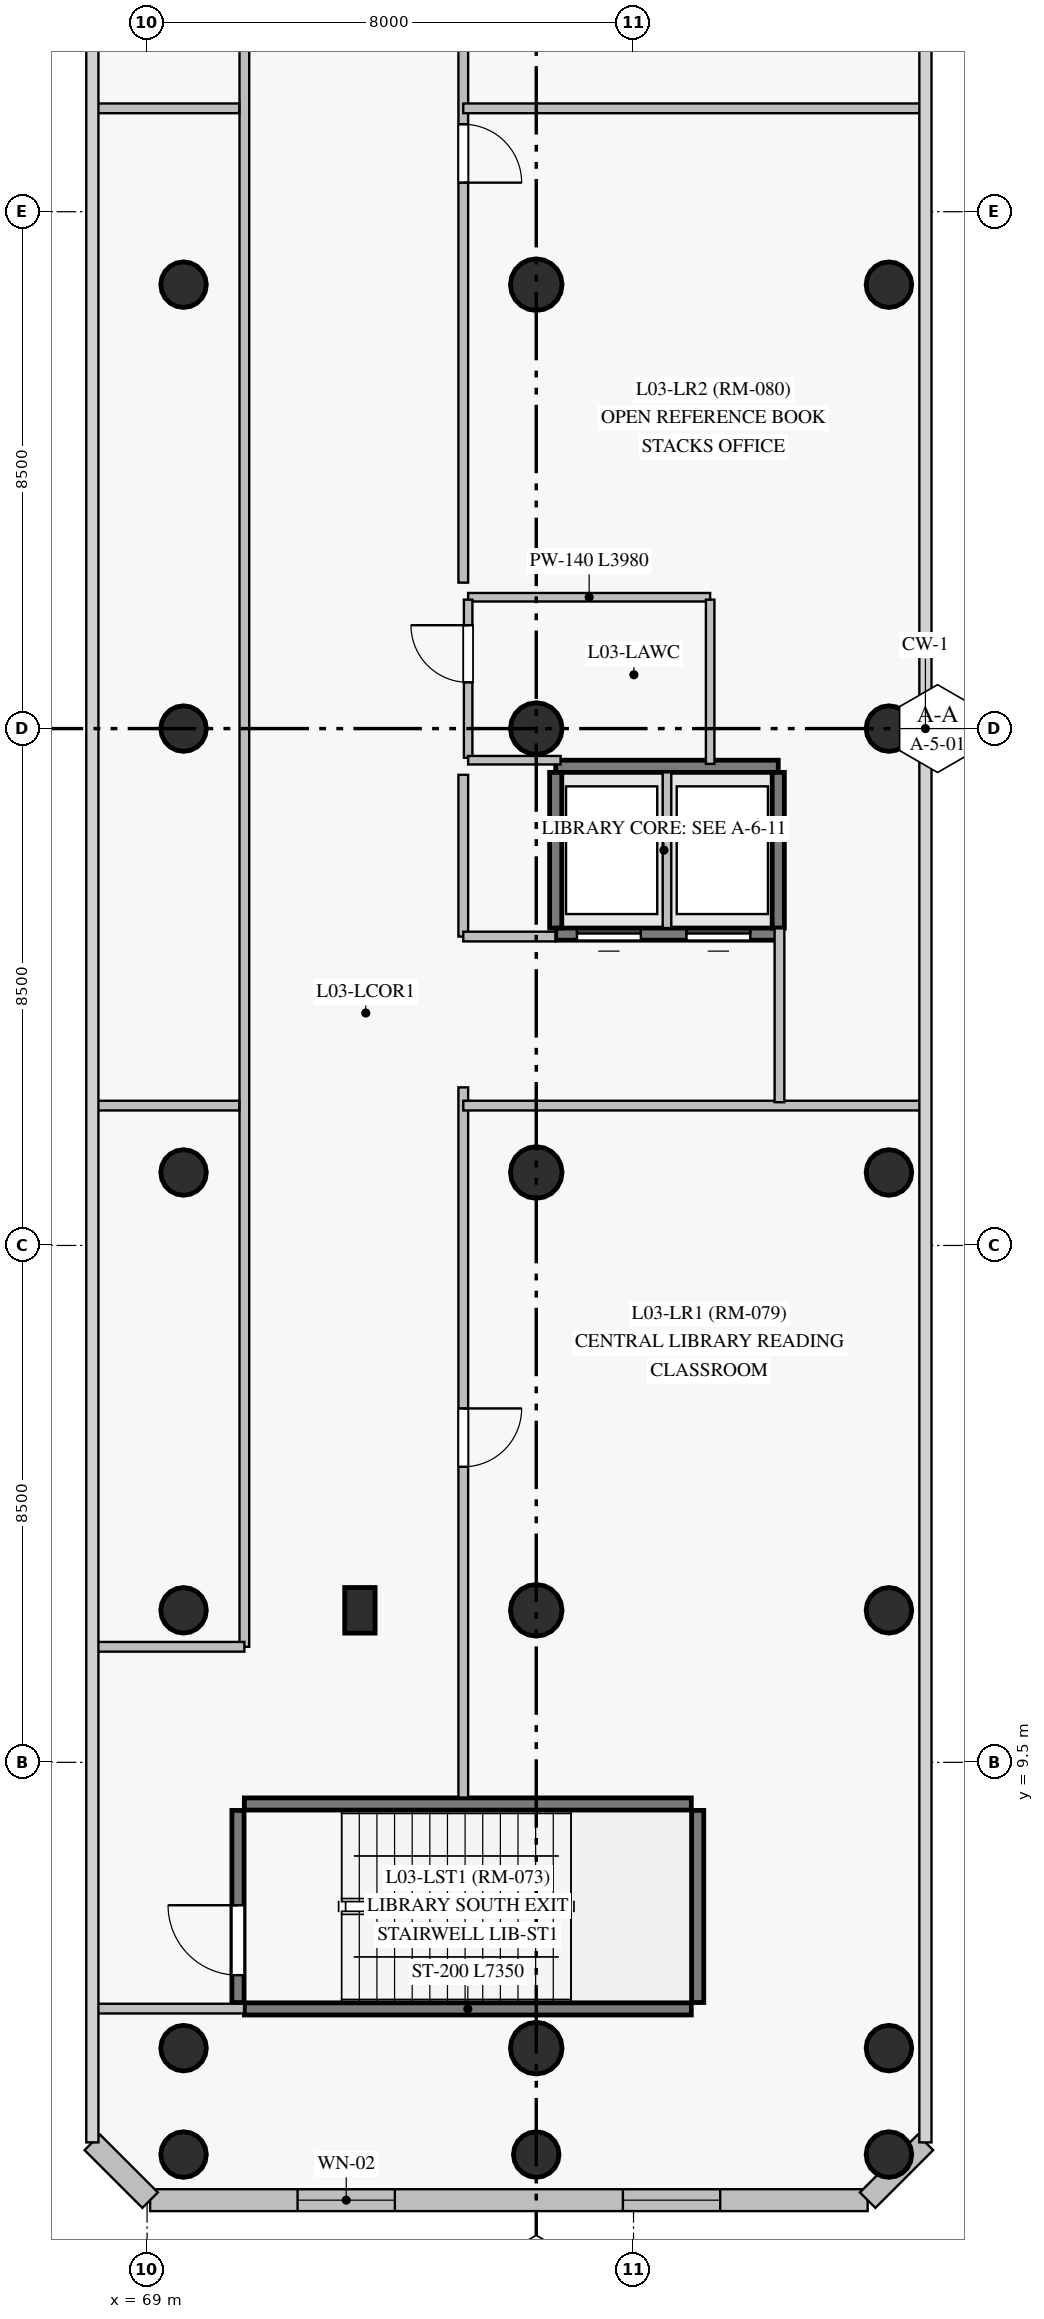
"""IFC4 building model, lengths in metres.
Left out: names, types, materials, properties, quantities, classifications, styles, units other than length and angle.
Written with IfcOpenShell. Run it as: python <this file> out.ifc"""

import sys

from ifc_helpers import new_model, si_unit, direction, frame, frame_2d, origin, origin_with_axes, origin_2d, place, context, subcontext, project, spatial, rectangle, circle, extrude, source, transform, mapped, element, fill, save


model = new_model("IFC4")
c1 = context("Model", 3, precision=1e-05, world=origin(), true_north=direction((0.0, 1.0)))
c2 = subcontext(c1, "Body", "Model", "MODEL_VIEW")
j1 = project(units=[si_unit("LENGTHUNIT", "METRE"), si_unit("PLANEANGLEUNIT", "RADIAN")], contexts=[c1])
p1 = place(None, origin())
s1 = spatial("IfcSite", under=j1, at=p1, CompositionType="ELEMENT")
p2 = place(p1, origin())
s2 = spatial("IfcBuilding", under=s1, at=p2, CompositionType="ELEMENT")
p3 = place(p2, frame((0.0, 0.0, 13.5)))
s3 = spatial("IfcBuildingStorey", under=s2, at=p3, CompositionType="ELEMENT", Elevation=13.5)
m1 = source(origin_with_axes(), c2, "Body", "SweptSolid", [
    extrude(circle(Radius=0.375, at=origin_2d()), origin(), (0.0, 0.0, 1.0), 4.5),
])
for number, where, z_axis, x_axis in (
    (1, (69.6, 3.05, 0.0), (0.0, 0.0, 1.0), (1.0, 0.0, 0.0)),
    (2, (75.4, 3.05, 0.0), (0.0, 0.0, 1.0), (1.0, 0.0, 0.0)),
    (3, (81.2, 3.05, 0.0), (0.0, 0.0, 1.0), (1.0, 0.0, 0.0)),
    (4, (69.6, 4.8, 0.0), (0.0, 0.0, 1.0), (1.0, 0.0, 0.0)),
    (5, (69.6, 12.0, 0.0), (0.0, 0.0, 1.0), (1.0, 0.0, 0.0)),
    (6, (69.6, 19.2, 0.0), (0.0, 0.0, 1.0), (1.0, 0.0, 0.0)),
    (7, (69.6, 26.5, 0.0), (0.0, 0.0, 1.0), (1.0, 0.0, 0.0)),
    (8, (69.6, 33.8, 0.0), (0.0, 0.0, 1.0), (1.0, 0.0, 0.0)),
):
    element("IfcColumn", number, at=place(p3, frame(where, z_axis=z_axis, x_axis=x_axis)), inside=s3, PredefinedType="COLUMN", context=c2, shape_type="MappedRepresentation", body=[
        mapped(m1, transform((0.0, 0.0, 0.0), scale=1.0)),
    ])
m2 = source(origin_with_axes(), c2, "Body", "SweptSolid", [
    extrude(circle(Radius=0.425, at=origin_2d()), origin(), (0.0, 0.0, 1.0), 4.5),
])
for number, where, z_axis, x_axis in (
    (9, (75.4, 4.8, 0.0), (0.0, 0.0, 1.0), (1.0, 0.0, 0.0)),
    (10, (75.4, 12.0, 0.0), (0.0, 0.0, 1.0), (1.0, 0.0, 0.0)),
    (11, (75.4, 19.2, 0.0), (0.0, 0.0, 1.0), (1.0, 0.0, 0.0)),
    (12, (75.4, 26.5, 0.0), (0.0, 0.0, 1.0), (1.0, 0.0, 0.0)),
    (13, (75.4, 33.8, 0.0), (0.0, 0.0, 1.0), (1.0, 0.0, 0.0)),
):
    element("IfcColumn", number, at=place(p3, frame(where, z_axis=z_axis, x_axis=x_axis)), inside=s3, PredefinedType="COLUMN", context=c2, shape_type="MappedRepresentation", body=[
        mapped(m2, transform((0.0, 0.0, 0.0), scale=1.0)),
    ])
for number, where, z_axis, x_axis in (
    (14, (81.2, 4.8, 0.0), (0.0, 0.0, 1.0), (1.0, 0.0, 0.0)),
    (15, (81.2, 12.0, 0.0), (0.0, 0.0, 1.0), (1.0, 0.0, 0.0)),
    (16, (81.2, 19.2, 0.0), (0.0, 0.0, 1.0), (1.0, 0.0, 0.0)),
    (17, (81.2, 26.5, 0.0), (0.0, 0.0, 1.0), (1.0, 0.0, 0.0)),
    (18, (81.2, 33.8, 0.0), (0.0, 0.0, 1.0), (1.0, 0.0, 0.0)),
):
    element("IfcColumn", number, at=place(p3, frame(where, z_axis=z_axis, x_axis=x_axis)), inside=s3, PredefinedType="COLUMN", context=c2, shape_type="MappedRepresentation", body=[
        mapped(m1, transform((0.0, 0.0, 0.0), scale=1.0)),
    ])
m3 = source(origin_with_axes(), c2, "Body", "SweptSolid", [
    extrude(rectangle(XDim=0.5, YDim=0.75, at=origin_2d()), origin(), (0.0, 0.0, 1.0), 4.5),
])
p4 = place(p3, frame((72.5, 12.0, 0.0), z_axis=(0.0, 0.0, 1.0), x_axis=(1.0, 0.0, 0.0)))
e19 = element("IfcColumn", 19, at=p4, inside=s3, PredefinedType="PILASTER", context=c2, shape_type="MappedRepresentation", body=[
    mapped(m3, transform((0.0, 0.0, 0.0), scale=1.0)),
])
p5 = place(p3, frame((69.05, 2.3, 0.0), z_axis=(0.0, 0.0, 1.0), x_axis=(1.0, 0.0, 0.0)))
e20 = element("IfcWall", 20, at=p5, inside=s3, PredefinedType="SOLIDWALL", context=c2, shape_type="SweptSolid", body=[
    extrude(rectangle(XDim=11.8, YDim=0.36, at=frame_2d((5.9, 0.0))), origin(), (0.0, 0.0, 1.0), 4.225),
])
p6 = place(p5, frame((2.425, 0.0, 0.85)))
e21 = element("IfcOpeningElement", 21, at=p6, cuts=e20, PredefinedType="OPENING", context=c2, shape_type="SweptSolid", body=[
    extrude(rectangle(XDim=1.6, YDim=2.2, at=frame_2d((0.8, 1.1))), frame((0.0, 0.19, 0.0), z_axis=(0.0, -1.0, 0.0), x_axis=(1.0, 0.0, 0.0)), (0.0, 0.0, 1.0), 0.38),
])
p7 = place(p5, frame((7.775, 0.0, 0.85)))
e22 = element("IfcOpeningElement", 22, at=p7, cuts=e20, PredefinedType="OPENING", context=c2, shape_type="SweptSolid", body=[
    extrude(rectangle(XDim=1.6, YDim=2.2, at=frame_2d((0.8, 1.1))), frame((0.0, 0.19, 0.0), z_axis=(0.0, -1.0, 0.0), x_axis=(1.0, 0.0, 0.0)), (0.0, 0.0, 1.0), 0.38),
])
for number, where, z_axis, x_axis in (
    (23, (80.85, 2.3, 0.0), (0.0, 0.0, 1.0), (0.707, 0.707, 0.0)),
    (24, (68.1, 3.25, 0.0), (0.0, 0.0, 1.0), (0.707, -0.707, 0.0)),
):
    element("IfcWall", number, at=place(p3, frame(where, z_axis=z_axis, x_axis=x_axis)), inside=s3, PredefinedType="SOLIDWALL", context=c2, shape_type="SweptSolid", body=[
        extrude(rectangle(XDim=1.344, YDim=0.36, at=frame_2d((0.672, 0.0))), origin(), (0.0, 0.0, 1.0), 4.225),
    ])
for number, where, z_axis, x_axis in (
    (25, (70.6, 5.445, 0.0), (0.0, 0.0, 1.0), (1.0, 0.0, 0.0)),
    (26, (70.6, 8.815, 0.0), (0.0, 0.0, 1.0), (1.0, 0.0, 0.0)),
):
    element("IfcWall", number, at=place(p3, frame(where, z_axis=z_axis, x_axis=x_axis)), inside=s3, PredefinedType="SHEAR", context=c2, shape_type="SweptSolid", body=[
        extrude(rectangle(XDim=7.35, YDim=0.2, at=frame_2d((3.675, 0.0))), origin(), (0.0, 0.0, 1.0), 4.225),
    ])
p8 = place(p3, frame((75.72, 23.12, 0.0), z_axis=(0.0, 0.0, 1.0), x_axis=(1.0, 0.0, 0.0)))
e27 = element("IfcWall", 27, at=p8, inside=s3, PredefinedType="SHEAR", context=c2, shape_type="SweptSolid", body=[
    extrude(rectangle(XDim=3.66, YDim=0.2, at=frame_2d((1.83, 0.0))), origin(), (0.0, 0.0, 1.0), 4.225),
])
p9 = place(p8, frame((0.35, 0.0, 0.0)))
e28 = element("IfcOpeningElement", 28, at=p9, cuts=e27, PredefinedType="OPENING", context=c2, shape_type="SweptSolid", body=[
    extrude(rectangle(XDim=1.05, YDim=2.15, at=frame_2d((0.525, 1.075))), frame((0.0, 0.11, 0.0), z_axis=(0.0, -1.0, 0.0), x_axis=(1.0, 0.0, 0.0)), (0.0, 0.0, 1.0), 0.22),
])
p10 = place(p8, frame((2.15, 0.0, 0.0)))
e29 = element("IfcOpeningElement", 29, at=p10, cuts=e27, PredefinedType="OPENING", context=c2, shape_type="SweptSolid", body=[
    extrude(rectangle(XDim=1.05, YDim=2.15, at=frame_2d((0.525, 1.075))), frame((0.0, 0.11, 0.0), z_axis=(0.0, -1.0, 0.0), x_axis=(1.0, 0.0, 0.0)), (0.0, 0.0, 1.0), 0.22),
])
p11 = place(p3, frame((75.72, 25.88, 0.0), z_axis=(0.0, 0.0, 1.0), x_axis=(1.0, 0.0, 0.0)))
e30 = element("IfcWall", 30, at=p11, inside=s3, PredefinedType="SHEAR", context=c2, shape_type="SweptSolid", body=[
    extrude(rectangle(XDim=3.66, YDim=0.2, at=frame_2d((1.83, 0.0))), origin(), (0.0, 0.0, 1.0), 4.225),
])
p12 = place(p3, frame((70.495, 5.55, 0.0), z_axis=(0.0, 0.0, 1.0), x_axis=(0.0, 1.0, 0.0)))
e31 = element("IfcWall", 31, at=p12, inside=s3, PredefinedType="SHEAR", context=c2, shape_type="SweptSolid", body=[
    extrude(rectangle(XDim=3.16, YDim=0.2, at=frame_2d((1.58, 0.0))), origin(), (0.0, 0.0, 1.0), 4.225),
])
p13 = place(p12, frame((0.45, 0.0, 0.0)))
e32 = element("IfcOpeningElement", 32, at=p13, cuts=e31, PredefinedType="OPENING", context=c2, shape_type="SweptSolid", body=[
    extrude(rectangle(XDim=1.15, YDim=2.15, at=frame_2d((0.575, 1.075))), frame((0.0, 0.11, 0.0), z_axis=(0.0, -1.0, 0.0), x_axis=(1.0, 0.0, 0.0)), (0.0, 0.0, 1.0), 0.22),
])
p14 = place(p3, frame((78.055, 5.55, 0.0), z_axis=(0.0, 0.0, 1.0), x_axis=(0.0, 1.0, 0.0)))
e33 = element("IfcWall", 33, at=p14, inside=s3, PredefinedType="SHEAR", context=c2, shape_type="SweptSolid", body=[
    extrude(rectangle(XDim=3.16, YDim=0.2, at=frame_2d((1.58, 0.0))), origin(), (0.0, 0.0, 1.0), 4.225),
])
for number, where, z_axis, x_axis in (
    (34, (75.72, 23.22, 0.0), (0.0, 0.0, 1.0), (0.0, 1.0, 0.0)),
    (35, (79.38, 23.22, 0.0), (0.0, 0.0, 1.0), (0.0, 1.0, 0.0)),
):
    element("IfcWall", number, at=place(p3, frame(where, z_axis=z_axis, x_axis=x_axis)), inside=s3, PredefinedType="SHEAR", context=c2, shape_type="SweptSolid", body=[
        extrude(rectangle(XDim=2.56, YDim=0.2, at=frame_2d((1.28, 0.0))), origin(), (0.0, 0.0, 1.0), 4.225),
    ])
p15 = place(p3, frame((70.6, 11.4, 0.0), z_axis=(0.0, 0.0, 1.0), x_axis=(0.0, 1.0, 0.0)))
e36 = element("IfcWall", 36, at=p15, inside=s3, PredefinedType="PARTITIONING", context=c2, shape_type="SweptSolid", body=[
    extrude(rectangle(XDim=30.2, YDim=0.16, at=frame_2d((15.1, 0.0))), origin(), (0.0, 0.0, 1.0), 4.225),
])
p16 = place(p3, frame((74.2, 44.038, 0.0), z_axis=(0.0, 0.0, 1.0), x_axis=(0.0, -1.0, 0.0)))
e37 = element("IfcWall", 37, at=p16, inside=s3, PredefinedType="PARTITIONING", context=c2, shape_type="SweptSolid", body=[
    extrude(rectangle(XDim=15.138, YDim=0.16, at=frame_2d((7.569, 0.0))), origin(), (0.0, 0.0, 1.0), 4.225),
])
p17 = place(p16, frame((7.6, 0.0, 0.0)))
e38 = element("IfcOpeningElement", 38, at=p17, cuts=e37, PredefinedType="OPENING", context=c2, shape_type="SweptSolid", body=[
    extrude(rectangle(XDim=0.96, YDim=2.15, at=frame_2d((0.48, 1.075))), frame((0.0, 0.09, 0.0), z_axis=(0.0, -1.0, 0.0), x_axis=(1.0, 0.0, 0.0)), (0.0, 0.0, 1.0), 0.18),
])
p18 = place(p16, frame((4.764, 0.0, 0.0)))
e39 = element("IfcOpeningElement", 39, at=p18, cuts=e37, PredefinedType="OPENING", context=c2, shape_type="SweptSolid", body=[
    extrude(rectangle(XDim=0.96, YDim=2.15, at=frame_2d((0.48, 1.075))), frame((0.0, 0.09, 0.0), z_axis=(0.0, -1.0, 0.0), x_axis=(1.0, 0.0, 0.0)), (0.0, 0.0, 1.0), 0.18),
])
p19 = place(p3, frame((74.2, 20.6, 0.0), z_axis=(0.0, 0.0, 1.0), x_axis=(0.0, -1.0, 0.0)))
e40 = element("IfcWall", 40, at=p19, inside=s3, PredefinedType="PARTITIONING", context=c2, shape_type="SweptSolid", body=[
    extrude(rectangle(XDim=11.678, YDim=0.16, at=frame_2d((5.839, 0.0))), origin(), (0.0, 0.0, 1.0), 4.225),
])
p20 = place(p19, frame((5.28, 0.0, 0.0)))
e41 = element("IfcOpeningElement", 41, at=p20, cuts=e40, PredefinedType="OPENING", context=c2, shape_type="SweptSolid", body=[
    extrude(rectangle(XDim=0.96, YDim=2.15, at=frame_2d((0.48, 1.075))), frame((0.0, 0.09, 0.0), z_axis=(0.0, -1.0, 0.0), x_axis=(1.0, 0.0, 0.0)), (0.0, 0.0, 1.0), 0.18),
])
for number, where, z_axis, x_axis in (
    (42, (74.2, 20.3, 0.0), (0.0, 0.0, 1.0), (1.0, 0.0, 0.0)),
    (43, (74.2, 36.7, 0.0), (0.0, 0.0, 1.0), (1.0, 0.0, 0.0)),
):
    element("IfcWall", number, at=place(p3, frame(where, z_axis=z_axis, x_axis=x_axis)), inside=s3, PredefinedType="PARTITIONING", context=c2, shape_type="SweptSolid", body=[
        extrude(rectangle(XDim=7.545, YDim=0.16, at=frame_2d((3.772, 0.0))), origin(), (0.0, 0.0, 1.0), 4.225),
    ])
p21 = place(p3, frame((74.28, 28.66, 0.0), z_axis=(0.0, 0.0, 1.0), x_axis=(1.0, 0.0, 0.0)))
e44 = element("IfcWall", 44, at=p21, inside=s3, PredefinedType="PARTITIONING", context=c2, shape_type="SweptSolid", body=[
    extrude(rectangle(XDim=3.98, YDim=0.14, at=frame_2d((1.99, 0.0))), origin(), (0.0, 0.0, 1.0), 4.225),
])
p22 = place(p3, frame((78.26, 25.92, 0.0), z_axis=(0.0, 0.0, 1.0), x_axis=(0.0, 1.0, 0.0)))
e45 = element("IfcWall", 45, at=p22, inside=s3, PredefinedType="PARTITIONING", context=c2, shape_type="SweptSolid", body=[
    extrude(rectangle(XDim=2.7, YDim=0.14, at=frame_2d((1.35, 0.0))), origin(), (0.0, 0.0, 1.0), 4.225),
])
p23 = place(p3, frame((74.2, 25.74, 0.0), z_axis=(0.0, 0.0, 1.0), x_axis=(0.0, -1.0, 0.0)))
e46 = element("IfcWall", 46, at=p23, inside=s3, PredefinedType="PARTITIONING", context=c2, shape_type="SweptSolid", body=[
    extrude(rectangle(XDim=2.66, YDim=0.16, at=frame_2d((1.33, 0.0))), origin(), (0.0, 0.0, 1.0), 4.225),
])
p24 = place(p3, frame((74.28, 26.02, 0.0), z_axis=(0.0, 0.0, 1.0), x_axis=(0.0, 1.0, 0.0)))
e47 = element("IfcWall", 47, at=p24, inside=s3, PredefinedType="PARTITIONING", context=c2, shape_type="SweptSolid", body=[
    extrude(rectangle(XDim=2.6, YDim=0.14, at=frame_2d((1.3, 0.0))), origin(), (0.0, 0.0, 1.0), 4.225),
])
p25 = place(p24, frame((1.24, 0.0, 0.0)))
e48 = element("IfcOpeningElement", 48, at=p25, cuts=e47, PredefinedType="OPENING", context=c2, shape_type="SweptSolid", body=[
    extrude(rectangle(XDim=0.94, YDim=2.1, at=frame_2d((0.47, 1.05))), frame((0.0, 0.08, 0.0), z_axis=(0.0, -1.0, 0.0), x_axis=(1.0, 0.0, 0.0)), (0.0, 0.0, 1.0), 0.16),
])
p26 = place(p3, frame((77.55, 23.22, 0.0), z_axis=(0.0, 0.0, 1.0), x_axis=(0.0, 1.0, 0.0)))
e49 = element("IfcWall", 49, at=p26, inside=s3, PredefinedType="PARTITIONING", context=c2, shape_type="SweptSolid", body=[
    extrude(rectangle(XDim=2.56, YDim=0.14, at=frame_2d((1.28, 0.0))), origin(), (0.0, 0.0, 1.0), 4.225),
])
for number, where, z_axis, x_axis in (
    (50, (68.155, 20.3, 0.0), (0.0, 0.0, 1.0), (1.0, 0.0, 0.0)),
    (51, (68.155, 36.7, 0.0), (0.0, 0.0, 1.0), (1.0, 0.0, 0.0)),
):
    element("IfcWall", number, at=place(p3, frame(where, z_axis=z_axis, x_axis=x_axis)), inside=s3, PredefinedType="PARTITIONING", context=c2, shape_type="SweptSolid", body=[
        extrude(rectangle(XDim=2.36, YDim=0.16, at=frame_2d((1.18, 0.0))), origin(), (0.0, 0.0, 1.0), 4.225),
    ])
p27 = place(p3, frame((79.4, 23.215, 0.0), z_axis=(0.0, 0.0, 1.0), x_axis=(0.0, -1.0, 0.0)))
e52 = element("IfcWall", 52, at=p27, inside=s3, PredefinedType="PARTITIONING", context=c2, shape_type="SweptSolid", body=[
    extrude(rectangle(XDim=2.859, YDim=0.16, at=frame_2d((1.43, 0.0))), origin(), (0.0, 0.0, 1.0), 4.225),
])
p28 = place(p3, frame((68.185, 11.4, 0.0), z_axis=(0.0, 0.0, 1.0), x_axis=(1.0, 0.0, 0.0)))
e53 = element("IfcWall", 53, at=p28, inside=s3, PredefinedType="PARTITIONING", context=c2, shape_type="SweptSolid", body=[
    extrude(rectangle(XDim=2.415, YDim=0.16, at=frame_2d((1.208, 0.0))), origin(), (0.0, 0.0, 1.0), 3.575),
])
p29 = place(p3, frame((70.595, 5.45, 0.0), z_axis=(0.0, 0.0, 1.0), x_axis=(-1.0, 0.0, 0.0)))
e54 = element("IfcWall", 54, at=p29, inside=s3, PredefinedType="PARTITIONING", context=c2, shape_type="SweptSolid", body=[
    extrude(rectangle(XDim=2.441, YDim=0.16, at=frame_2d((1.22, 0.0))), origin(), (0.0, 0.0, 1.0), 3.575),
])
p30 = place(p3, frame((74.28, 25.98, 0.0), z_axis=(0.0, 0.0, 1.0), x_axis=(1.0, 0.0, 0.0)))
e55 = element("IfcWall", 55, at=p30, inside=s3, PredefinedType="PARTITIONING", context=c2, shape_type="SweptSolid", body=[
    extrude(rectangle(XDim=1.52, YDim=0.14, at=frame_2d((0.76, 0.0))), origin(), (0.0, 0.0, 1.0), 3.575),
])
p31 = place(p3, frame((74.2, 23.08, 0.0), z_axis=(0.0, 0.0, 1.0), x_axis=(1.0, 0.0, 0.0)))
e56 = element("IfcWall", 56, at=p31, inside=s3, PredefinedType="PARTITIONING", context=c2, shape_type="SweptSolid", body=[
    extrude(rectangle(XDim=1.515, YDim=0.16, at=frame_2d((0.758, 0.0))), origin(), (0.0, 0.0, 1.0), 3.725),
])
m4 = source(origin_with_axes(), c2, "Body", "SweptSolid", [
    extrude(rectangle(XDim=1.6, YDim=2.2, at=frame_2d((0.8, 1.1))), frame((0.0, 0.03, 0.0), z_axis=(0.0, -1.0, 0.0), x_axis=(1.0, 0.0, 0.0)), (0.0, 0.0, 1.0), 0.06),
])
p32 = place(p6, origin())
e57 = element("IfcWindow", 57, at=p32, inside=s3, PartitioningType="SINGLE_PANEL", PredefinedType="WINDOW", context=c2, shape_type="MappedRepresentation", body=[
    mapped(m4, transform((0.0, 0.0, 0.0), scale=1.0)),
])
fill(e21, e57)
p33 = place(p7, origin())
e58 = element("IfcWindow", 58, at=p33, inside=s3, PartitioningType="SINGLE_PANEL", PredefinedType="WINDOW", context=c2, shape_type="MappedRepresentation", body=[
    mapped(m4, transform((0.0, 0.0, 0.0), scale=1.0)),
])
fill(e22, e58)
m5 = source(origin_with_axes(), c2, "Body", "SweptSolid", [
    extrude(rectangle(XDim=1.15, YDim=2.15, at=frame_2d((0.575, 1.075))), frame((0.0, 0.025, 0.0), z_axis=(0.0, -1.0, 0.0), x_axis=(1.0, 0.0, 0.0)), (0.0, 0.0, 1.0), 0.05),
])
p34 = place(p13, origin())
e59 = element("IfcDoor", 59, at=p34, inside=s3, OperationType="SINGLE_SWING_RIGHT", PredefinedType="DOOR", context=c2, shape_type="MappedRepresentation", body=[
    mapped(m5, transform((0.0, 0.0, 0.0), scale=1.0)),
])
fill(e32, e59)
m6 = source(origin_with_axes(), c2, "Body", "SweptSolid", [
    extrude(rectangle(XDim=1.05, YDim=2.15, at=frame_2d((0.525, 1.075))), frame((0.0, 0.025, 0.0), z_axis=(0.0, -1.0, 0.0), x_axis=(1.0, 0.0, 0.0)), (0.0, 0.0, 1.0), 0.05),
])
p35 = place(p9, origin())
e60 = element("IfcDoor", 60, at=p35, inside=s3, OperationType="SLIDING_TO_LEFT", PredefinedType="DOOR", context=c2, shape_type="MappedRepresentation", body=[
    mapped(m6, transform((0.0, 0.0, 0.0), scale=1.0)),
])
fill(e28, e60)
p36 = place(p10, origin())
e61 = element("IfcDoor", 61, at=p36, inside=s3, OperationType="SLIDING_TO_RIGHT", PredefinedType="DOOR", context=c2, shape_type="MappedRepresentation", body=[
    mapped(m6, transform((0.0, 0.0, 0.0), scale=1.0)),
])
fill(e29, e61)
m7 = source(origin_with_axes(), c2, "Body", "SweptSolid", [
    extrude(rectangle(XDim=0.94, YDim=2.1, at=frame_2d((0.47, 1.05))), frame((0.0, 0.025, 0.0), z_axis=(0.0, -1.0, 0.0), x_axis=(1.0, 0.0, 0.0)), (0.0, 0.0, 1.0), 0.05),
])
p37 = place(p25, origin())
e62 = element("IfcDoor", 62, at=p37, inside=s3, OperationType="SINGLE_SWING_RIGHT", PredefinedType="DOOR", context=c2, shape_type="MappedRepresentation", body=[
    mapped(m7, transform((0.0, 0.0, 0.0), scale=1.0)),
])
fill(e48, e62)
m8 = source(origin_with_axes(), c2, "Body", "SweptSolid", [
    extrude(rectangle(XDim=0.96, YDim=2.15, at=frame_2d((0.48, 1.075))), frame((0.0, 0.025, 0.0), z_axis=(0.0, -1.0, 0.0), x_axis=(1.0, 0.0, 0.0)), (0.0, 0.0, 1.0), 0.05),
])
p38 = place(p20, origin())
e63 = element("IfcDoor", 63, at=p38, inside=s3, OperationType="SINGLE_SWING_LEFT", PredefinedType="DOOR", context=c2, shape_type="MappedRepresentation", body=[
    mapped(m8, transform((0.0, 0.0, 0.0), scale=1.0)),
])
fill(e41, e63)
p39 = place(p17, origin())
e64 = element("IfcDoor", 64, at=p39, inside=s3, OperationType="SINGLE_SWING_RIGHT", PredefinedType="DOOR", context=c2, shape_type="MappedRepresentation", body=[
    mapped(m8, transform((0.0, 0.0, 0.0), scale=1.0)),
])
fill(e38, e64)
save(model, sys.argv[1])
